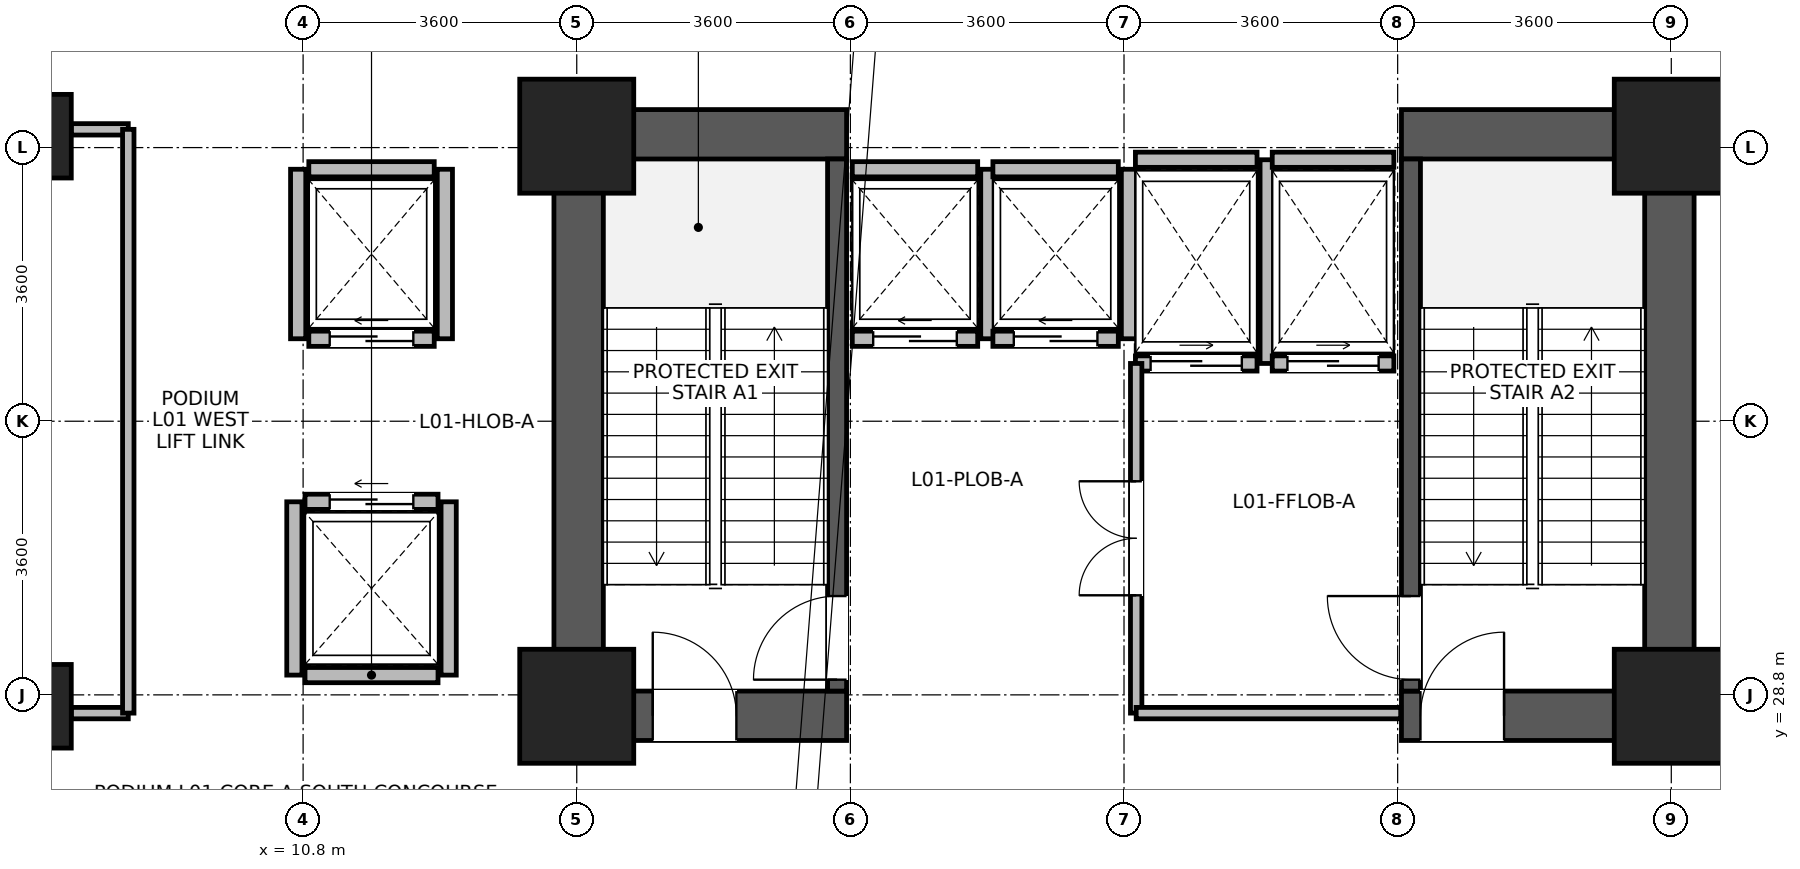
"""IFC4 building model, lengths in metres.
Left out: names, types, materials, properties, quantities, classifications, styles, units other than length and angle.
Written with IfcOpenShell. Run it as: python <this file> out.ifc"""

import sys

from ifc_helpers import new_model, si_unit, direction, frame, frame_2d, origin, origin_2d, place, context, subcontext, project, spatial, rectangle, circle, extrude, source, transform, mapped, element, fill, save


model = new_model("IFC4")
c1 = context("Model", 3, precision=1e-05, world=origin(), true_north=direction((0.0, 1.0)))
c2 = subcontext(c1, "Body", "Model", "MODEL_VIEW")
j1 = project(units=[si_unit("LENGTHUNIT", "METRE"), si_unit("PLANEANGLEUNIT", "RADIAN")], contexts=[c1])
p1 = place(None, origin())
s1 = spatial("IfcSite", under=j1, at=p1, CompositionType="ELEMENT")
p2 = place(p1, origin())
s2 = spatial("IfcBuilding", under=s1, at=p2, CompositionType="ELEMENT")
p3 = place(p2, frame((0.0, 0.0, 5.4)))
s3 = spatial("IfcBuildingStorey", under=s2, at=p3, CompositionType="ELEMENT", Elevation=5.4)
for number, where, z_axis, x_axis in (
    (1, (14.425, 28.2, 0.0), (0.0, 0.0, 1.0), (0.0, 1.0, 0.0)),
    (2, (28.775, 28.2, 0.0), (0.0, 0.0, 1.0), (0.0, 1.0, 0.0)),
):
    element("IfcWall", number, at=place(p3, frame(where, z_axis=z_axis, x_axis=x_axis)), inside=s3, PredefinedType="SHEAR", context=c2, shape_type="SweptSolid", body=[
        extrude(rectangle(XDim=8.3, YDim=0.65, at=frame_2d((4.15, 0.0))), origin(), (0.0, 0.0, 1.0), 4.52),
    ])
p4 = place(p3, frame((14.75, 28.525, 0.0), z_axis=(0.0, 0.0, 1.0), x_axis=(1.0, 0.0, 0.0)))
e3 = element("IfcWall", 3, at=p4, inside=s3, PredefinedType="SHEAR", context=c2, shape_type="SweptSolid", body=[
    extrude(rectangle(XDim=3.2, YDim=0.65, at=frame_2d((1.6, 0.0))), origin(), (0.0, 0.0, 1.0), 4.52),
])
p5 = place(p4, frame((0.65, 0.0, 0.0)))
e4 = element("IfcOpeningElement", 4, at=p5, cuts=e3, PredefinedType="OPENING", context=c2, shape_type="SweptSolid", body=[
    extrude(rectangle(XDim=1.1, YDim=2.08, at=frame_2d((0.55, 1.04))), frame((0.0, 0.335, 0.0), z_axis=(0.0, -1.0, 0.0), x_axis=(1.0, 0.0, 0.0)), (0.0, 0.0, 1.0), 0.67),
])
p6 = place(p3, frame((25.25, 28.525, 0.0), z_axis=(0.0, 0.0, 1.0), x_axis=(1.0, 0.0, 0.0)))
e5 = element("IfcWall", 5, at=p6, inside=s3, PredefinedType="SHEAR", context=c2, shape_type="SweptSolid", body=[
    extrude(rectangle(XDim=3.2, YDim=0.65, at=frame_2d((1.6, 0.0))), origin(), (0.0, 0.0, 1.0), 4.52),
])
p7 = place(p6, frame((0.25, 0.0, 0.0)))
e6 = element("IfcOpeningElement", 6, at=p7, cuts=e5, PredefinedType="OPENING", context=c2, shape_type="SweptSolid", body=[
    extrude(rectangle(XDim=1.1, YDim=2.08, at=frame_2d((0.55, 1.04))), frame((0.0, 0.335, 0.0), z_axis=(0.0, -1.0, 0.0), x_axis=(1.0, 0.0, 0.0)), (0.0, 0.0, 1.0), 0.67),
])
for number, where, z_axis, x_axis in (
    (7, (14.75, 36.175, 0.0), (0.0, 0.0, 1.0), (1.0, 0.0, 0.0)),
    (8, (25.25, 36.175, 0.0), (0.0, 0.0, 1.0), (1.0, 0.0, 0.0)),
):
    element("IfcWall", number, at=place(p3, frame(where, z_axis=z_axis, x_axis=x_axis)), inside=s3, PredefinedType="SHEAR", context=c2, shape_type="SweptSolid", body=[
        extrude(rectangle(XDim=3.2, YDim=0.65, at=frame_2d((1.6, 0.0))), origin(), (0.0, 0.0, 1.0), 4.52),
    ])
p8 = place(p3, frame((17.825, 28.85, 0.0), z_axis=(0.0, 0.0, 1.0), x_axis=(0.0, 1.0, 0.0)))
e9 = element("IfcWall", 9, at=p8, inside=s3, PredefinedType="SHEAR", context=c2, shape_type="SweptSolid", body=[
    extrude(rectangle(XDim=7.0, YDim=0.25, at=frame_2d((3.5, 0.0))), origin(), (0.0, 0.0, 1.0), 4.52),
])
p9 = place(p8, frame((0.15, 0.0, 0.0)))
e10 = element("IfcOpeningElement", 10, at=p9, cuts=e9, PredefinedType="OPENING", context=c2, shape_type="SweptSolid", body=[
    extrude(rectangle(XDim=1.1, YDim=2.08, at=frame_2d((0.55, 1.04))), frame((0.0, 0.135, 0.0), z_axis=(0.0, -1.0, 0.0), x_axis=(1.0, 0.0, 0.0)), (0.0, 0.0, 1.0), 0.27),
])
p10 = place(p3, frame((25.375, 28.85, 0.0), z_axis=(0.0, 0.0, 1.0), x_axis=(0.0, 1.0, 0.0)))
e11 = element("IfcWall", 11, at=p10, inside=s3, PredefinedType="SHEAR", context=c2, shape_type="SweptSolid", body=[
    extrude(rectangle(XDim=7.0, YDim=0.25, at=frame_2d((3.5, 0.0))), origin(), (0.0, 0.0, 1.0), 4.52),
])
p11 = place(p10, frame((0.15, 0.0, 0.0)))
e12 = element("IfcOpeningElement", 12, at=p11, cuts=e11, PredefinedType="OPENING", context=c2, shape_type="SweptSolid", body=[
    extrude(rectangle(XDim=1.1, YDim=2.08, at=frame_2d((0.55, 1.04))), frame((0.0, 0.135, 0.0), z_axis=(0.0, -1.0, 0.0), x_axis=(1.0, 0.0, 0.0)), (0.0, 0.0, 1.0), 0.27),
])
m1 = source(origin(), c2, "Body", "SweptSolid", [
    extrude(circle(Radius=0.55, at=origin_2d()), origin(), (0.0, 0.0, 1.0), 4.8),
])
for number, where, z_axis, x_axis in (
    (13, (7.2, 28.65, 0.0), (0.0, 0.0, 1.0), (1.0, 0.0, 0.0)),
    (14, (7.2, 36.15, 0.0), (0.0, 0.0, 1.0), (1.0, 0.0, 0.0)),
):
    element("IfcColumn", number, at=place(p3, frame(where, z_axis=z_axis, x_axis=x_axis)), inside=s3, PredefinedType="COLUMN", context=c2, shape_type="MappedRepresentation", body=[
        mapped(m1, transform((0.0, 0.0, 0.0), x_axis=(1.0, 0.0, 0.0), y_axis=(0.0, 1.0, 0.0), z_axis=(0.0, 0.0, 1.0), scale=1.0)),
    ])
m2 = source(origin(), c2, "Body", "SweptSolid", [
    extrude(rectangle(XDim=1.5, YDim=1.5, at=origin_2d()), origin(), (0.0, 0.0, 1.0), 4.8),
])
for number, where, z_axis, x_axis in (
    (15, (14.4, 28.65, 0.0), (0.0, 0.0, 1.0), (1.0, 0.0, 0.0)),
    (16, (14.4, 36.15, 0.0), (0.0, 0.0, 1.0), (1.0, 0.0, 0.0)),
    (17, (28.8, 28.65, 0.0), (0.0, 0.0, 1.0), (1.0, 0.0, 0.0)),
    (18, (28.8, 36.15, 0.0), (0.0, 0.0, 1.0), (1.0, 0.0, 0.0)),
):
    element("IfcColumn", number, at=place(p3, frame(where, z_axis=z_axis, x_axis=x_axis)), inside=s3, PredefinedType="COLUMN", context=c2, shape_type="MappedRepresentation", body=[
        mapped(m2, transform((0.0, 0.0, 0.0), x_axis=(1.0, 0.0, 0.0), y_axis=(0.0, 1.0, 0.0), z_axis=(0.0, 0.0, 1.0), scale=1.0)),
    ])
p12 = place(p3, frame((18.025, 33.485, 0.0), z_axis=(0.0, 0.0, 1.0), x_axis=(1.0, 0.0, 0.0)))
e19 = element("IfcWall", 19, at=p12, inside=s3, PredefinedType="PARTITIONING", context=c2, shape_type="SweptSolid", body=[
    extrude(rectangle(XDim=1.65, YDim=0.2, at=frame_2d((0.825, 0.0))), origin(), (0.0, 0.0, 1.0), 4.5),
])
p13 = place(p12, frame((0.275, 0.0, 0.0)))
e20 = element("IfcOpeningElement", 20, at=p13, cuts=e19, PredefinedType="OPENING", context=c2, shape_type="SweptSolid", body=[
    extrude(rectangle(XDim=1.1, YDim=2.12, at=frame_2d((0.55, 1.06))), frame((0.0, 0.11, 0.0), z_axis=(0.0, -1.0, 0.0), x_axis=(1.0, 0.0, 0.0)), (0.0, 0.0, 1.0), 0.22),
])
p14 = place(p3, frame((18.025, 35.715, 0.0), z_axis=(0.0, 0.0, 1.0), x_axis=(1.0, 0.0, 0.0)))
e21 = element("IfcWall", 21, at=p14, inside=s3, PredefinedType="PARTITIONING", context=c2, shape_type="SweptSolid", body=[
    extrude(rectangle(XDim=1.65, YDim=0.2, at=frame_2d((0.825, 0.0))), origin(), (0.0, 0.0, 1.0), 4.5),
])
p15 = place(p3, frame((19.815, 33.485, 0.0), z_axis=(0.0, 0.0, 1.0), x_axis=(0.0, 1.0, 0.0)))
e22 = element("IfcWall", 22, at=p15, inside=s3, PredefinedType="PARTITIONING", context=c2, shape_type="SweptSolid", body=[
    extrude(rectangle(XDim=2.23, YDim=0.2, at=frame_2d((1.115, 0.0))), origin(), (0.0, 0.0, 1.0), 4.5),
])
p16 = place(p3, frame((19.875, 33.485, 0.0), z_axis=(0.0, 0.0, 1.0), x_axis=(1.0, 0.0, 0.0)))
e23 = element("IfcWall", 23, at=p16, inside=s3, PredefinedType="PARTITIONING", context=c2, shape_type="SweptSolid", body=[
    extrude(rectangle(XDim=1.65, YDim=0.2, at=frame_2d((0.825, 0.0))), origin(), (0.0, 0.0, 1.0), 4.5),
])
p17 = place(p16, frame((0.275, 0.0, 0.0)))
e24 = element("IfcOpeningElement", 24, at=p17, cuts=e23, PredefinedType="OPENING", context=c2, shape_type="SweptSolid", body=[
    extrude(rectangle(XDim=1.1, YDim=2.12, at=frame_2d((0.55, 1.06))), frame((0.0, 0.11, 0.0), z_axis=(0.0, -1.0, 0.0), x_axis=(1.0, 0.0, 0.0)), (0.0, 0.0, 1.0), 0.22),
])
p18 = place(p3, frame((19.875, 35.715, 0.0), z_axis=(0.0, 0.0, 1.0), x_axis=(1.0, 0.0, 0.0)))
e25 = element("IfcWall", 25, at=p18, inside=s3, PredefinedType="PARTITIONING", context=c2, shape_type="SweptSolid", body=[
    extrude(rectangle(XDim=1.65, YDim=0.2, at=frame_2d((0.825, 0.0))), origin(), (0.0, 0.0, 1.0), 4.5),
])
p19 = place(p3, frame((21.665, 33.485, 0.0), z_axis=(0.0, 0.0, 1.0), x_axis=(0.0, 1.0, 0.0)))
e26 = element("IfcWall", 26, at=p19, inside=s3, PredefinedType="PARTITIONING", context=c2, shape_type="SweptSolid", body=[
    extrude(rectangle(XDim=2.23, YDim=0.2, at=frame_2d((1.115, 0.0))), origin(), (0.0, 0.0, 1.0), 4.5),
])
p20 = place(p3, frame((10.825, 29.06, 0.0), z_axis=(0.0, 0.0, 1.0), x_axis=(1.0, 0.0, 0.0)))
e27 = element("IfcWall", 27, at=p20, inside=s3, PredefinedType="PARTITIONING", context=c2, shape_type="SweptSolid", body=[
    extrude(rectangle(XDim=1.75, YDim=0.2, at=frame_2d((0.875, 0.0))), origin(), (0.0, 0.0, 1.0), 4.5),
])
p21 = place(p3, frame((10.825, 31.34, 0.0), z_axis=(0.0, 0.0, 1.0), x_axis=(1.0, 0.0, 0.0)))
e28 = element("IfcWall", 28, at=p21, inside=s3, PredefinedType="PARTITIONING", context=c2, shape_type="SweptSolid", body=[
    extrude(rectangle(XDim=1.75, YDim=0.2, at=frame_2d((0.875, 0.0))), origin(), (0.0, 0.0, 1.0), 4.5),
])
p22 = place(p21, frame((0.325, 0.0, 0.0)))
e29 = element("IfcOpeningElement", 29, at=p22, cuts=e28, PredefinedType="OPENING", context=c2, shape_type="SweptSolid", body=[
    extrude(rectangle(XDim=1.1, YDim=2.12, at=frame_2d((0.55, 1.06))), frame((0.0, 0.11, 0.0), z_axis=(0.0, -1.0, 0.0), x_axis=(1.0, 0.0, 0.0)), (0.0, 0.0, 1.0), 0.22),
])
for number, where, z_axis, x_axis in (
    (30, (10.685, 29.06, 0.0), (0.0, 0.0, 1.0), (0.0, 1.0, 0.0)),
    (31, (12.715, 29.06, 0.0), (0.0, 0.0, 1.0), (0.0, 1.0, 0.0)),
):
    element("IfcWall", number, at=place(p3, frame(where, z_axis=z_axis, x_axis=x_axis)), inside=s3, PredefinedType="PARTITIONING", context=c2, shape_type="SweptSolid", body=[
        extrude(rectangle(XDim=2.28, YDim=0.2, at=frame_2d((1.14, 0.0))), origin(), (0.0, 0.0, 1.0), 4.5),
    ])
p23 = place(p3, frame((10.875, 33.485, 0.0), z_axis=(0.0, 0.0, 1.0), x_axis=(1.0, 0.0, 0.0)))
e32 = element("IfcWall", 32, at=p23, inside=s3, PredefinedType="PARTITIONING", context=c2, shape_type="SweptSolid", body=[
    extrude(rectangle(XDim=1.65, YDim=0.2, at=frame_2d((0.825, 0.0))), origin(), (0.0, 0.0, 1.0), 4.5),
])
p24 = place(p23, frame((0.275, 0.0, 0.0)))
e33 = element("IfcOpeningElement", 33, at=p24, cuts=e32, PredefinedType="OPENING", context=c2, shape_type="SweptSolid", body=[
    extrude(rectangle(XDim=1.1, YDim=2.12, at=frame_2d((0.55, 1.06))), frame((0.0, 0.11, 0.0), z_axis=(0.0, -1.0, 0.0), x_axis=(1.0, 0.0, 0.0)), (0.0, 0.0, 1.0), 0.22),
])
p25 = place(p3, frame((10.875, 35.715, 0.0), z_axis=(0.0, 0.0, 1.0), x_axis=(1.0, 0.0, 0.0)))
e34 = element("IfcWall", 34, at=p25, inside=s3, PredefinedType="PARTITIONING", context=c2, shape_type="SweptSolid", body=[
    extrude(rectangle(XDim=1.65, YDim=0.2, at=frame_2d((0.825, 0.0))), origin(), (0.0, 0.0, 1.0), 4.5),
])
for number, where, z_axis, x_axis in (
    (35, (10.735, 33.485, 0.0), (0.0, 0.0, 1.0), (0.0, 1.0, 0.0)),
    (36, (12.665, 33.485, 0.0), (0.0, 0.0, 1.0), (0.0, 1.0, 0.0)),
):
    element("IfcWall", number, at=place(p3, frame(where, z_axis=z_axis, x_axis=x_axis)), inside=s3, PredefinedType="PARTITIONING", context=c2, shape_type="SweptSolid", body=[
        extrude(rectangle(XDim=2.23, YDim=0.2, at=frame_2d((1.115, 0.0))), origin(), (0.0, 0.0, 1.0), 4.5),
    ])
p26 = place(p3, frame((21.75, 33.16, 0.0), z_axis=(0.0, 0.0, 1.0), x_axis=(1.0, 0.0, 0.0)))
e37 = element("IfcWall", 37, at=p26, inside=s3, PredefinedType="PARTITIONING", context=c2, shape_type="SweptSolid", body=[
    extrude(rectangle(XDim=1.6, YDim=0.2, at=frame_2d((0.8, 0.0))), origin(), (0.0, 0.0, 1.0), 4.5),
])
p27 = place(p26, frame((0.2, 0.0, 0.0)))
e38 = element("IfcOpeningElement", 38, at=p27, cuts=e37, PredefinedType="OPENING", context=c2, shape_type="SweptSolid", body=[
    extrude(rectangle(XDim=1.2, YDim=2.12, at=frame_2d((0.6, 1.06))), frame((0.0, 0.11, 0.0), z_axis=(0.0, -1.0, 0.0), x_axis=(1.0, 0.0, 0.0)), (0.0, 0.0, 1.0), 0.22),
])
p28 = place(p3, frame((21.75, 35.84, 0.0), z_axis=(0.0, 0.0, 1.0), x_axis=(1.0, 0.0, 0.0)))
e39 = element("IfcWall", 39, at=p28, inside=s3, PredefinedType="PARTITIONING", context=c2, shape_type="SweptSolid", body=[
    extrude(rectangle(XDim=1.6, YDim=0.2, at=frame_2d((0.8, 0.0))), origin(), (0.0, 0.0, 1.0), 3.3),
])
p29 = place(p3, frame((23.49, 33.16, 0.0), z_axis=(0.0, 0.0, 1.0), x_axis=(0.0, 1.0, 0.0)))
e40 = element("IfcWall", 40, at=p29, inside=s3, PredefinedType="PARTITIONING", context=c2, shape_type="SweptSolid", body=[
    extrude(rectangle(XDim=2.68, YDim=0.2, at=frame_2d((1.34, 0.0))), origin(), (0.0, 0.0, 1.0), 4.5),
])
p30 = place(p3, frame((23.55, 33.16, 0.0), z_axis=(0.0, 0.0, 1.0), x_axis=(1.0, 0.0, 0.0)))
e41 = element("IfcWall", 41, at=p30, inside=s3, PredefinedType="PARTITIONING", context=c2, shape_type="SweptSolid", body=[
    extrude(rectangle(XDim=1.6, YDim=0.2, at=frame_2d((0.8, 0.0))), origin(), (0.0, 0.0, 1.0), 4.5),
])
p31 = place(p30, frame((0.2, 0.0, 0.0)))
e42 = element("IfcOpeningElement", 42, at=p31, cuts=e41, PredefinedType="OPENING", context=c2, shape_type="SweptSolid", body=[
    extrude(rectangle(XDim=1.2, YDim=2.12, at=frame_2d((0.6, 1.06))), frame((0.0, 0.11, 0.0), z_axis=(0.0, -1.0, 0.0), x_axis=(1.0, 0.0, 0.0)), (0.0, 0.0, 1.0), 0.22),
])
p32 = place(p3, frame((23.55, 35.84, 0.0), z_axis=(0.0, 0.0, 1.0), x_axis=(1.0, 0.0, 0.0)))
e43 = element("IfcWall", 43, at=p32, inside=s3, PredefinedType="PARTITIONING", context=c2, shape_type="SweptSolid", body=[
    extrude(rectangle(XDim=1.6, YDim=0.2, at=frame_2d((0.8, 0.0))), origin(), (0.0, 0.0, 1.0), 3.3),
])
for number, where, z_axis, x_axis in (
    (44, (7.75, 28.56, 0.0), (0.0, 0.0, 1.0), (1.0, 0.0, 0.0)),
    (45, (7.75, 36.24, 0.0), (0.0, 0.0, 1.0), (1.0, 0.0, 0.0)),
):
    element("IfcWall", number, at=place(p3, frame(where, z_axis=z_axis, x_axis=x_axis)), inside=s3, PredefinedType="PARTITIONING", context=c2, shape_type="SweptSolid", body=[
        extrude(rectangle(XDim=0.75, YDim=0.15, at=frame_2d((0.375, 0.0))), origin(), (0.0, 0.0, 1.0), 3.8),
    ])
p33 = place(p3, frame((8.5, 28.56, 0.0), z_axis=(0.0, 0.0, 1.0), x_axis=(0.0, 1.0, 0.0)))
e46 = element("IfcWall", 46, at=p33, inside=s3, PredefinedType="PARTITIONING", context=c2, shape_type="SweptSolid", body=[
    extrude(rectangle(XDim=7.68, YDim=0.15, at=frame_2d((3.84, 0.0))), origin(), (0.0, 0.0, 1.0), 4.5),
])
p34 = place(p3, frame((21.76, 28.56, 0.0), z_axis=(0.0, 0.0, 1.0), x_axis=(0.0, 1.0, 0.0)))
e47 = element("IfcWall", 47, at=p34, inside=s3, PredefinedType="PARTITIONING", context=c2, shape_type="SweptSolid", body=[
    extrude(rectangle(XDim=4.6, YDim=0.15, at=frame_2d((2.3, 0.0))), origin(), (0.0, 0.0, 1.0), 4.5),
])
p35 = place(p34, frame((1.55, 0.0, 0.0)))
e48 = element("IfcOpeningElement", 48, at=p35, cuts=e47, PredefinedType="OPENING", context=c2, shape_type="SweptSolid", body=[
    extrude(rectangle(XDim=1.5, YDim=2.1, at=frame_2d((0.75, 1.05))), frame((0.0, 0.085, 0.0), z_axis=(0.0, -1.0, 0.0), x_axis=(1.0, 0.0, 0.0)), (0.0, 0.0, 1.0), 0.17),
])
p36 = place(p3, frame((21.76, 28.56, 0.0), z_axis=(0.0, 0.0, 1.0), x_axis=(1.0, 0.0, 0.0)))
e49 = element("IfcWall", 49, at=p36, inside=s3, PredefinedType="PARTITIONING", context=c2, shape_type="SweptSolid", body=[
    extrude(rectangle(XDim=3.48, YDim=0.15, at=frame_2d((1.74, 0.0))), origin(), (0.0, 0.0, 1.0), 3.3),
])
p37 = place(p9, origin())
e50 = element("IfcDoor", 50, at=p37, inside=s3, OperationType="SINGLE_SWING_LEFT", PredefinedType="DOOR", context=c2, shape_type="SweptSolid", body=[
    extrude(rectangle(XDim=1.1, YDim=2.08, at=frame_2d((0.55, 1.04))), frame((0.0, 0.025, 0.0), z_axis=(0.0, -1.0, 0.0), x_axis=(1.0, 0.0, 0.0)), (0.0, 0.0, 1.0), 0.05),
])
fill(e10, e50)
p38 = place(p5, origin())
e51 = element("IfcDoor", 51, at=p38, inside=s3, OperationType="SINGLE_SWING_LEFT", PredefinedType="DOOR", context=c2, shape_type="SweptSolid", body=[
    extrude(rectangle(XDim=1.1, YDim=2.08, at=frame_2d((0.55, 1.04))), frame((0.0, 0.025, 0.0), z_axis=(0.0, -1.0, 0.0), x_axis=(1.0, 0.0, 0.0)), (0.0, 0.0, 1.0), 0.05),
])
fill(e4, e51)
p39 = place(p11, origin())
e52 = element("IfcDoor", 52, at=p39, inside=s3, OperationType="SINGLE_SWING_RIGHT", PredefinedType="DOOR", context=c2, shape_type="SweptSolid", body=[
    extrude(rectangle(XDim=1.1, YDim=2.08, at=frame_2d((0.55, 1.04))), frame((0.0, 0.025, 0.0), z_axis=(0.0, -1.0, 0.0), x_axis=(1.0, 0.0, 0.0)), (0.0, 0.0, 1.0), 0.05),
])
fill(e12, e52)
p40 = place(p7, origin())
e53 = element("IfcDoor", 53, at=p40, inside=s3, OperationType="SINGLE_SWING_RIGHT", PredefinedType="DOOR", context=c2, shape_type="SweptSolid", body=[
    extrude(rectangle(XDim=1.1, YDim=2.08, at=frame_2d((0.55, 1.04))), frame((0.0, 0.025, 0.0), z_axis=(0.0, -1.0, 0.0), x_axis=(1.0, 0.0, 0.0)), (0.0, 0.0, 1.0), 0.05),
])
fill(e6, e53)
p41 = place(p13, origin())
e54 = element("IfcDoor", 54, at=p41, inside=s3, OperationType="SLIDING_TO_LEFT", PredefinedType="DOOR", context=c2, shape_type="SweptSolid", body=[
    extrude(rectangle(XDim=1.1, YDim=2.12, at=frame_2d((0.55, 1.06))), frame((0.0, 0.025, 0.0), z_axis=(0.0, -1.0, 0.0), x_axis=(1.0, 0.0, 0.0)), (0.0, 0.0, 1.0), 0.05),
])
fill(e20, e54)
p42 = place(p17, origin())
e55 = element("IfcDoor", 55, at=p42, inside=s3, OperationType="SLIDING_TO_LEFT", PredefinedType="DOOR", context=c2, shape_type="SweptSolid", body=[
    extrude(rectangle(XDim=1.1, YDim=2.12, at=frame_2d((0.55, 1.06))), frame((0.0, 0.025, 0.0), z_axis=(0.0, -1.0, 0.0), x_axis=(1.0, 0.0, 0.0)), (0.0, 0.0, 1.0), 0.05),
])
fill(e24, e55)
p43 = place(p22, origin())
e56 = element("IfcDoor", 56, at=p43, inside=s3, OperationType="SLIDING_TO_LEFT", PredefinedType="DOOR", context=c2, shape_type="SweptSolid", body=[
    extrude(rectangle(XDim=1.1, YDim=2.12, at=frame_2d((0.55, 1.06))), frame((0.0, 0.025, 0.0), z_axis=(0.0, -1.0, 0.0), x_axis=(1.0, 0.0, 0.0)), (0.0, 0.0, 1.0), 0.05),
])
fill(e29, e56)
p44 = place(p24, origin())
e57 = element("IfcDoor", 57, at=p44, inside=s3, OperationType="SLIDING_TO_LEFT", PredefinedType="DOOR", context=c2, shape_type="SweptSolid", body=[
    extrude(rectangle(XDim=1.1, YDim=2.12, at=frame_2d((0.55, 1.06))), frame((0.0, 0.025, 0.0), z_axis=(0.0, -1.0, 0.0), x_axis=(1.0, 0.0, 0.0)), (0.0, 0.0, 1.0), 0.05),
])
fill(e33, e57)
p45 = place(p27, origin())
e58 = element("IfcDoor", 58, at=p45, inside=s3, OperationType="SLIDING_TO_RIGHT", PredefinedType="DOOR", context=c2, shape_type="SweptSolid", body=[
    extrude(rectangle(XDim=1.2, YDim=2.12, at=frame_2d((0.6, 1.06))), frame((0.0, 0.025, 0.0), z_axis=(0.0, -1.0, 0.0), x_axis=(1.0, 0.0, 0.0)), (0.0, 0.0, 1.0), 0.05),
])
fill(e38, e58)
p46 = place(p31, origin())
e59 = element("IfcDoor", 59, at=p46, inside=s3, OperationType="SLIDING_TO_RIGHT", PredefinedType="DOOR", context=c2, shape_type="SweptSolid", body=[
    extrude(rectangle(XDim=1.2, YDim=2.12, at=frame_2d((0.6, 1.06))), frame((0.0, 0.025, 0.0), z_axis=(0.0, -1.0, 0.0), x_axis=(1.0, 0.0, 0.0)), (0.0, 0.0, 1.0), 0.05),
])
fill(e42, e59)
p47 = place(p35, origin())
e60 = element("IfcDoor", 60, at=p47, inside=s3, OperationType="DOUBLE_DOOR_SINGLE_SWING", PredefinedType="DOOR", context=c2, shape_type="SweptSolid", body=[
    extrude(rectangle(XDim=1.5, YDim=2.1, at=frame_2d((0.75, 1.05))), frame((0.0, 0.025, 0.0), z_axis=(0.0, -1.0, 0.0), x_axis=(1.0, 0.0, 0.0)), (0.0, 0.0, 1.0), 0.05),
])
fill(e48, e60)
save(model, sys.argv[1])
